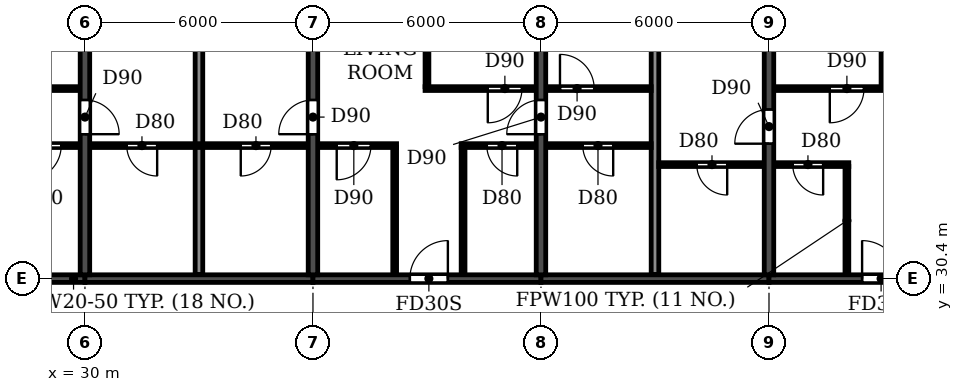
"""IFC4 building model, lengths in metres.
Left out: names, types, materials, properties, quantities, classifications, styles, units other than length and angle.
Written with IfcOpenShell. Run it as: python <this file> out.ifc"""

import sys

from ifc_helpers import new_model, si_unit, direction, frame, frame_2d, origin, place, context, subcontext, project, spatial, rectangle, extrude, element, fill, save


model = new_model("IFC4")
c1 = context("Model", 3, precision=1e-05, world=origin(), true_north=direction((0.0, 1.0)))
c2 = subcontext(c1, "Body", "Model", "MODEL_VIEW")
j1 = project(units=[si_unit("LENGTHUNIT", "METRE"), si_unit("PLANEANGLEUNIT", "RADIAN")], contexts=[c1])
p1 = place(None, origin())
s1 = spatial("IfcSite", under=j1, at=p1, CompositionType="ELEMENT")
p2 = place(p1, origin())
s2 = spatial("IfcBuilding", under=s1, at=p2, CompositionType="ELEMENT")
p3 = place(p2, frame((0.0, 0.0, 241.2)))
s3 = spatial("IfcBuildingStorey", under=s2, at=p3, CompositionType="ELEMENT", Elevation=241.2)
p4 = place(p3, frame((30.0, 30.5, 0.0), z_axis=(0.0, 0.0, 1.0), x_axis=(0.0, 1.0, 0.0)))
e1 = element("IfcWall", 1, at=p4, inside=s3, PredefinedType="SHEAR", context=c2, shape_type="SweptSolid", body=[
    extrude(rectangle(XDim=10.5, YDim=0.25, at=frame_2d((5.25, 0.0))), origin(), (0.0, 0.0, 1.0), 3.08),
])
p5 = place(p4, frame((3.7, 0.0, 0.0)))
e2 = element("IfcOpeningElement", 2, at=p5, cuts=e1, PredefinedType="OPENING", context=c2, shape_type="SweptSolid", body=[
    extrude(rectangle(XDim=0.9, YDim=2.1, at=frame_2d((0.45, 1.05))), frame((0.0, 0.135, 0.0), z_axis=(0.0, -1.0, 0.0), x_axis=(1.0, 0.0, 0.0)), (0.0, 0.0, 1.0), 0.27),
])
p6 = place(p3, frame((36.0, 30.5, 0.0), z_axis=(0.0, 0.0, 1.0), x_axis=(0.0, 1.0, 0.0)))
e3 = element("IfcWall", 3, at=p6, inside=s3, PredefinedType="SHEAR", context=c2, shape_type="SweptSolid", body=[
    extrude(rectangle(XDim=10.5, YDim=0.25, at=frame_2d((5.25, 0.0))), origin(), (0.0, 0.0, 1.0), 3.08),
])
p7 = place(p6, frame((3.7, 0.0, 0.0)))
e4 = element("IfcOpeningElement", 4, at=p7, cuts=e3, PredefinedType="OPENING", context=c2, shape_type="SweptSolid", body=[
    extrude(rectangle(XDim=0.9, YDim=2.1, at=frame_2d((0.45, 1.05))), frame((0.0, 0.135, 0.0), z_axis=(0.0, -1.0, 0.0), x_axis=(1.0, 0.0, 0.0)), (0.0, 0.0, 1.0), 0.27),
])
p8 = place(p3, frame((42.0, 30.5, 0.0), z_axis=(0.0, 0.0, 1.0), x_axis=(0.0, 1.0, 0.0)))
e5 = element("IfcWall", 5, at=p8, inside=s3, PredefinedType="SHEAR", context=c2, shape_type="SweptSolid", body=[
    extrude(rectangle(XDim=10.5, YDim=0.25, at=frame_2d((5.25, 0.0))), origin(), (0.0, 0.0, 1.0), 3.08),
])
p9 = place(p8, frame((3.7, 0.0, 0.0)))
e6 = element("IfcOpeningElement", 6, at=p9, cuts=e5, PredefinedType="OPENING", context=c2, shape_type="SweptSolid", body=[
    extrude(rectangle(XDim=0.9, YDim=2.1, at=frame_2d((0.45, 1.05))), frame((0.0, 0.135, 0.0), z_axis=(0.0, -1.0, 0.0), x_axis=(1.0, 0.0, 0.0)), (0.0, 0.0, 1.0), 0.27),
])
p10 = place(p3, frame((48.0, 30.5, 0.0), z_axis=(0.0, 0.0, 1.0), x_axis=(0.0, 1.0, 0.0)))
e7 = element("IfcWall", 7, at=p10, inside=s3, PredefinedType="SHEAR", context=c2, shape_type="SweptSolid", body=[
    extrude(rectangle(XDim=10.5, YDim=0.25, at=frame_2d((5.25, 0.0))), origin(), (0.0, 0.0, 1.0), 3.08),
])
p11 = place(p10, frame((3.45, 0.0, 0.0)))
e8 = element("IfcOpeningElement", 8, at=p11, cuts=e7, PredefinedType="OPENING", context=c2, shape_type="SweptSolid", body=[
    extrude(rectangle(XDim=0.9, YDim=2.1, at=frame_2d((0.45, 1.05))), frame((0.0, 0.135, 0.0), z_axis=(0.0, -1.0, 0.0), x_axis=(1.0, 0.0, 0.0)), (0.0, 0.0, 1.0), 0.27),
])
p12 = place(p3, frame((24.0, 30.4, 0.0), z_axis=(0.0, 0.0, 1.0), x_axis=(1.0, 0.0, 0.0)))
e9 = element("IfcWall", 9, at=p12, inside=s3, PredefinedType="SHEAR", context=c2, shape_type="SweptSolid", body=[
    extrude(rectangle(XDim=6.0, YDim=0.2, at=frame_2d((3.0, 0.0))), origin(), (0.0, 0.0, 1.0), 2.48),
])
p13 = place(p12, frame((2.45, 0.0, 0.0)))
e10 = element("IfcOpeningElement", 10, at=p13, cuts=e9, PredefinedType="OPENING", context=c2, shape_type="SweptSolid", body=[
    extrude(rectangle(XDim=1.0, YDim=2.1, at=frame_2d((0.5, 1.05))), frame((0.0, 0.11, 0.0), z_axis=(0.0, -1.0, 0.0), x_axis=(1.0, 0.0, 0.0)), (0.0, 0.0, 1.0), 0.22),
])
p14 = place(p3, frame((30.0, 30.4, 0.0), z_axis=(0.0, 0.0, 1.0), x_axis=(1.0, 0.0, 0.0)))
e11 = element("IfcWall", 11, at=p14, inside=s3, PredefinedType="SHEAR", context=c2, shape_type="SweptSolid", body=[
    extrude(rectangle(XDim=6.0, YDim=0.2, at=frame_2d((3.0, 0.0))), origin(), (0.0, 0.0, 1.0), 2.48),
])
p15 = place(p3, frame((36.0, 30.4, 0.0), z_axis=(0.0, 0.0, 1.0), x_axis=(1.0, 0.0, 0.0)))
e12 = element("IfcWall", 12, at=p15, inside=s3, PredefinedType="SHEAR", context=c2, shape_type="SweptSolid", body=[
    extrude(rectangle(XDim=6.0, YDim=0.2, at=frame_2d((3.0, 0.0))), origin(), (0.0, 0.0, 1.0), 2.48),
])
p16 = place(p15, frame((2.55, 0.0, 0.0)))
e13 = element("IfcOpeningElement", 13, at=p16, cuts=e12, PredefinedType="OPENING", context=c2, shape_type="SweptSolid", body=[
    extrude(rectangle(XDim=1.0, YDim=2.1, at=frame_2d((0.5, 1.05))), frame((0.0, 0.11, 0.0), z_axis=(0.0, -1.0, 0.0), x_axis=(1.0, 0.0, 0.0)), (0.0, 0.0, 1.0), 0.22),
])
p17 = place(p3, frame((42.0, 30.4, 0.0), z_axis=(0.0, 0.0, 1.0), x_axis=(1.0, 0.0, 0.0)))
e14 = element("IfcWall", 14, at=p17, inside=s3, PredefinedType="SHEAR", context=c2, shape_type="SweptSolid", body=[
    extrude(rectangle(XDim=6.0, YDim=0.2, at=frame_2d((3.0, 0.0))), origin(), (0.0, 0.0, 1.0), 2.48),
])
p18 = place(p3, frame((48.0, 30.4, 0.0), z_axis=(0.0, 0.0, 1.0), x_axis=(1.0, 0.0, 0.0)))
e15 = element("IfcWall", 15, at=p18, inside=s3, PredefinedType="SHEAR", context=c2, shape_type="SweptSolid", body=[
    extrude(rectangle(XDim=6.0, YDim=0.2, at=frame_2d((3.0, 0.0))), origin(), (0.0, 0.0, 1.0), 2.48),
])
p19 = place(p18, frame((2.45, 0.0, 0.0)))
e16 = element("IfcOpeningElement", 16, at=p19, cuts=e15, PredefinedType="OPENING", context=c2, shape_type="SweptSolid", body=[
    extrude(rectangle(XDim=1.0, YDim=2.1, at=frame_2d((0.5, 1.05))), frame((0.0, 0.11, 0.0), z_axis=(0.0, -1.0, 0.0), x_axis=(1.0, 0.0, 0.0)), (0.0, 0.0, 1.0), 0.22),
])
for number, where, z_axis, x_axis in (
    (17, (33.0, 30.51, 0.0), (0.0, 0.0, 1.0), (0.0, 1.0, 0.0)),
    (18, (45.0, 30.51, 0.0), (0.0, 0.0, 1.0), (0.0, 1.0, 0.0)),
):
    element("IfcWall", number, at=place(p3, frame(where, z_axis=z_axis, x_axis=x_axis)), inside=s3, PredefinedType="PARTITIONING", context=c2, shape_type="SweptSolid", body=[
        extrude(rectangle(XDim=10.63, YDim=0.2, at=frame_2d((5.315, 0.0))), origin(), (0.0, 0.0, 1.0), 3.08),
    ])
p20 = place(p3, frame((45.1, 33.4, 0.0), z_axis=(0.0, 0.0, 1.0), x_axis=(1.0, 0.0, 0.0)))
e19 = element("IfcWall", 19, at=p20, inside=s3, PredefinedType="PARTITIONING", context=c2, shape_type="SweptSolid", body=[
    extrude(rectangle(XDim=2.765, YDim=0.1, at=frame_2d((1.382, 0.0))), origin(), (0.0, 0.0, 1.0), 3.08),
])
p21 = place(p20, frame((1.0, 0.0, 0.0)))
e20 = element("IfcOpeningElement", 20, at=p21, cuts=e19, PredefinedType="OPENING", context=c2, shape_type="SweptSolid", body=[
    extrude(rectangle(XDim=0.8, YDim=2.1, at=frame_2d((0.4, 1.05))), frame((0.0, 0.06, 0.0), z_axis=(0.0, -1.0, 0.0), x_axis=(1.0, 0.0, 0.0)), (0.0, 0.0, 1.0), 0.12),
])
p22 = place(p3, frame((48.135, 33.4, 0.0), z_axis=(0.0, 0.0, 1.0), x_axis=(1.0, 0.0, 0.0)))
e21 = element("IfcWall", 21, at=p22, inside=s3, PredefinedType="PARTITIONING", context=c2, shape_type="SweptSolid", body=[
    extrude(rectangle(XDim=1.965, YDim=0.1, at=frame_2d((0.982, 0.0))), origin(), (0.0, 0.0, 1.0), 3.08),
])
p23 = place(p22, frame((0.49, 0.0, 0.0)))
e22 = element("IfcOpeningElement", 22, at=p23, cuts=e21, PredefinedType="OPENING", context=c2, shape_type="SweptSolid", body=[
    extrude(rectangle(XDim=0.8, YDim=2.1, at=frame_2d((0.4, 1.05))), frame((0.0, 0.06, 0.0), z_axis=(0.0, -1.0, 0.0), x_axis=(1.0, 0.0, 0.0)), (0.0, 0.0, 1.0), 0.12),
])
p24 = place(p3, frame((27.8, 33.9, 0.0), z_axis=(0.0, 0.0, 1.0), x_axis=(1.0, 0.0, 0.0)))
e23 = element("IfcWall", 23, at=p24, inside=s3, PredefinedType="PARTITIONING", context=c2, shape_type="SweptSolid", body=[
    extrude(rectangle(XDim=2.065, YDim=0.1, at=frame_2d((1.032, 0.0))), origin(), (0.0, 0.0, 1.0), 3.08),
])
p25 = place(p24, frame((0.675, 0.0, 0.0)))
e24 = element("IfcOpeningElement", 24, at=p25, cuts=e23, PredefinedType="OPENING", context=c2, shape_type="SweptSolid", body=[
    extrude(rectangle(XDim=0.9, YDim=2.1, at=frame_2d((0.45, 1.05))), frame((0.0, 0.06, 0.0), z_axis=(0.0, -1.0, 0.0), x_axis=(1.0, 0.0, 0.0)), (0.0, 0.0, 1.0), 0.12),
])
p26 = place(p3, frame((30.135, 33.9, 0.0), z_axis=(0.0, 0.0, 1.0), x_axis=(1.0, 0.0, 0.0)))
e25 = element("IfcWall", 25, at=p26, inside=s3, PredefinedType="PARTITIONING", context=c2, shape_type="SweptSolid", body=[
    extrude(rectangle(XDim=5.73, YDim=0.1, at=frame_2d((2.865, 0.0))), origin(), (0.0, 0.0, 1.0), 3.08),
])
p27 = place(p26, frame((0.965, 0.0, 0.0)))
e26 = element("IfcOpeningElement", 26, at=p27, cuts=e25, PredefinedType="OPENING", context=c2, shape_type="SweptSolid", body=[
    extrude(rectangle(XDim=0.8, YDim=2.1, at=frame_2d((0.4, 1.05))), frame((0.0, 0.06, 0.0), z_axis=(0.0, -1.0, 0.0), x_axis=(1.0, 0.0, 0.0)), (0.0, 0.0, 1.0), 0.12),
])
p28 = place(p26, frame((3.965, 0.0, 0.0)))
e27 = element("IfcOpeningElement", 27, at=p28, cuts=e25, PredefinedType="OPENING", context=c2, shape_type="SweptSolid", body=[
    extrude(rectangle(XDim=0.8, YDim=2.1, at=frame_2d((0.4, 1.05))), frame((0.0, 0.06, 0.0), z_axis=(0.0, -1.0, 0.0), x_axis=(1.0, 0.0, 0.0)), (0.0, 0.0, 1.0), 0.12),
])
p29 = place(p3, frame((36.135, 33.9, 0.0), z_axis=(0.0, 0.0, 1.0), x_axis=(1.0, 0.0, 0.0)))
e28 = element("IfcWall", 28, at=p29, inside=s3, PredefinedType="PARTITIONING", context=c2, shape_type="SweptSolid", body=[
    extrude(rectangle(XDim=2.065, YDim=0.1, at=frame_2d((1.032, 0.0))), origin(), (0.0, 0.0, 1.0), 3.08),
])
p30 = place(p29, frame((0.49, 0.0, 0.0)))
e29 = element("IfcOpeningElement", 29, at=p30, cuts=e28, PredefinedType="OPENING", context=c2, shape_type="SweptSolid", body=[
    extrude(rectangle(XDim=0.9, YDim=2.1, at=frame_2d((0.45, 1.05))), frame((0.0, 0.06, 0.0), z_axis=(0.0, -1.0, 0.0), x_axis=(1.0, 0.0, 0.0)), (0.0, 0.0, 1.0), 0.12),
])
p31 = place(p3, frame((39.9, 33.9, 0.0), z_axis=(0.0, 0.0, 1.0), x_axis=(1.0, 0.0, 0.0)))
e30 = element("IfcWall", 30, at=p31, inside=s3, PredefinedType="PARTITIONING", context=c2, shape_type="SweptSolid", body=[
    extrude(rectangle(XDim=1.965, YDim=0.1, at=frame_2d((0.982, 0.0))), origin(), (0.0, 0.0, 1.0), 3.08),
])
p32 = place(p31, frame((0.675, 0.0, 0.0)))
e31 = element("IfcOpeningElement", 31, at=p32, cuts=e30, PredefinedType="OPENING", context=c2, shape_type="SweptSolid", body=[
    extrude(rectangle(XDim=0.8, YDim=2.1, at=frame_2d((0.4, 1.05))), frame((0.0, 0.06, 0.0), z_axis=(0.0, -1.0, 0.0), x_axis=(1.0, 0.0, 0.0)), (0.0, 0.0, 1.0), 0.12),
])
p33 = place(p3, frame((42.135, 33.9, 0.0), z_axis=(0.0, 0.0, 1.0), x_axis=(1.0, 0.0, 0.0)))
e32 = element("IfcWall", 32, at=p33, inside=s3, PredefinedType="PARTITIONING", context=c2, shape_type="SweptSolid", body=[
    extrude(rectangle(XDim=2.765, YDim=0.1, at=frame_2d((1.382, 0.0))), origin(), (0.0, 0.0, 1.0), 3.08),
])
p34 = place(p33, frame((0.965, 0.0, 0.0)))
e33 = element("IfcOpeningElement", 33, at=p34, cuts=e32, PredefinedType="OPENING", context=c2, shape_type="SweptSolid", body=[
    extrude(rectangle(XDim=0.8, YDim=2.1, at=frame_2d((0.4, 1.05))), frame((0.0, 0.06, 0.0), z_axis=(0.0, -1.0, 0.0), x_axis=(1.0, 0.0, 0.0)), (0.0, 0.0, 1.0), 0.12),
])
p35 = place(p3, frame((26.95, 35.4, 0.0), z_axis=(0.0, 0.0, 1.0), x_axis=(1.0, 0.0, 0.0)))
e34 = element("IfcWall", 34, at=p35, inside=s3, PredefinedType="PARTITIONING", context=c2, shape_type="SweptSolid", body=[
    extrude(rectangle(XDim=2.915, YDim=0.1, at=frame_2d((1.458, 0.0))), origin(), (0.0, 0.0, 1.0), 3.08),
])
p36 = place(p35, frame((0.55, 0.0, 0.0)))
e35 = element("IfcOpeningElement", 35, at=p36, cuts=e34, PredefinedType="OPENING", context=c2, shape_type="SweptSolid", body=[
    extrude(rectangle(XDim=0.9, YDim=2.1, at=frame_2d((0.45, 1.05))), frame((0.0, 0.06, 0.0), z_axis=(0.0, -1.0, 0.0), x_axis=(1.0, 0.0, 0.0)), (0.0, 0.0, 1.0), 0.12),
])
p37 = place(p3, frame((38.95, 35.4, 0.0), z_axis=(0.0, 0.0, 1.0), x_axis=(1.0, 0.0, 0.0)))
e36 = element("IfcWall", 36, at=p37, inside=s3, PredefinedType="PARTITIONING", context=c2, shape_type="SweptSolid", body=[
    extrude(rectangle(XDim=2.915, YDim=0.1, at=frame_2d((1.458, 0.0))), origin(), (0.0, 0.0, 1.0), 3.08),
])
p38 = place(p37, frame((1.65, 0.0, 0.0)))
e37 = element("IfcOpeningElement", 37, at=p38, cuts=e36, PredefinedType="OPENING", context=c2, shape_type="SweptSolid", body=[
    extrude(rectangle(XDim=0.9, YDim=2.1, at=frame_2d((0.45, 1.05))), frame((0.0, 0.06, 0.0), z_axis=(0.0, -1.0, 0.0), x_axis=(1.0, 0.0, 0.0)), (0.0, 0.0, 1.0), 0.12),
])
p39 = place(p3, frame((42.135, 35.4, 0.0), z_axis=(0.0, 0.0, 1.0), x_axis=(1.0, 0.0, 0.0)))
e38 = element("IfcWall", 38, at=p39, inside=s3, PredefinedType="PARTITIONING", context=c2, shape_type="SweptSolid", body=[
    extrude(rectangle(XDim=2.765, YDim=0.1, at=frame_2d((1.382, 0.0))), origin(), (0.0, 0.0, 1.0), 3.08),
])
p40 = place(p39, frame((0.365, 0.0, 0.0)))
e39 = element("IfcOpeningElement", 39, at=p40, cuts=e38, PredefinedType="OPENING", context=c2, shape_type="SweptSolid", body=[
    extrude(rectangle(XDim=0.9, YDim=2.1, at=frame_2d((0.45, 1.05))), frame((0.0, 0.06, 0.0), z_axis=(0.0, -1.0, 0.0), x_axis=(1.0, 0.0, 0.0)), (0.0, 0.0, 1.0), 0.12),
])
p41 = place(p3, frame((48.135, 35.4, 0.0), z_axis=(0.0, 0.0, 1.0), x_axis=(1.0, 0.0, 0.0)))
e40 = element("IfcWall", 40, at=p41, inside=s3, PredefinedType="PARTITIONING", context=c2, shape_type="SweptSolid", body=[
    extrude(rectangle(XDim=2.915, YDim=0.1, at=frame_2d((1.458, 0.0))), origin(), (0.0, 0.0, 1.0), 3.08),
])
p42 = place(p41, frame((1.465, 0.0, 0.0)))
e41 = element("IfcOpeningElement", 41, at=p42, cuts=e40, PredefinedType="OPENING", context=c2, shape_type="SweptSolid", body=[
    extrude(rectangle(XDim=0.9, YDim=2.1, at=frame_2d((0.45, 1.05))), frame((0.0, 0.06, 0.0), z_axis=(0.0, -1.0, 0.0), x_axis=(1.0, 0.0, 0.0)), (0.0, 0.0, 1.0), 0.12),
])
p43 = place(p3, frame((38.15, 30.51, 0.0), z_axis=(0.0, 0.0, 1.0), x_axis=(0.0, 1.0, 0.0)))
e42 = element("IfcWall", 42, at=p43, inside=s3, PredefinedType="PARTITIONING", context=c2, shape_type="SweptSolid", body=[
    extrude(rectangle(XDim=3.34, YDim=0.1, at=frame_2d((1.67, 0.0))), origin(), (0.0, 0.0, 1.0), 3.08),
])
p44 = place(p3, frame((39.0, 35.45, 0.0), z_axis=(0.0, 0.0, 1.0), x_axis=(0.0, 1.0, 0.0)))
e43 = element("IfcWall", 43, at=p44, inside=s3, PredefinedType="PARTITIONING", context=c2, shape_type="SweptSolid", body=[
    extrude(rectangle(XDim=5.69, YDim=0.1, at=frame_2d((2.845, 0.0))), origin(), (0.0, 0.0, 1.0), 3.08),
])
p45 = place(p3, frame((39.95, 30.51, 0.0), z_axis=(0.0, 0.0, 1.0), x_axis=(0.0, 1.0, 0.0)))
e44 = element("IfcWall", 44, at=p45, inside=s3, PredefinedType="PARTITIONING", context=c2, shape_type="SweptSolid", body=[
    extrude(rectangle(XDim=3.34, YDim=0.1, at=frame_2d((1.67, 0.0))), origin(), (0.0, 0.0, 1.0), 3.08),
])
p46 = place(p3, frame((50.05, 30.51, 0.0), z_axis=(0.0, 0.0, 1.0), x_axis=(0.0, 1.0, 0.0)))
e45 = element("IfcWall", 45, at=p46, inside=s3, PredefinedType="PARTITIONING", context=c2, shape_type="SweptSolid", body=[
    extrude(rectangle(XDim=2.84, YDim=0.1, at=frame_2d((1.42, 0.0))), origin(), (0.0, 0.0, 1.0), 3.08),
])
p47 = place(p3, frame((51.0, 35.45, 0.0), z_axis=(0.0, 0.0, 1.0), x_axis=(0.0, 1.0, 0.0)))
e46 = element("IfcWall", 46, at=p47, inside=s3, PredefinedType="PARTITIONING", context=c2, shape_type="SweptSolid", body=[
    extrude(rectangle(XDim=5.69, YDim=0.1, at=frame_2d((2.845, 0.0))), origin(), (0.0, 0.0, 1.0), 3.08),
])
p48 = place(p27, frame((0.8, 0.0, 0.0), z_axis=(0.0, 0.0, 1.0), x_axis=(-1.0, 0.0, 0.0)))
e47 = element("IfcDoor", 47, at=p48, inside=s3, OperationType="SINGLE_SWING_LEFT", PredefinedType="DOOR", context=c2, shape_type="SweptSolid", body=[
    extrude(rectangle(XDim=0.8, YDim=2.1, at=frame_2d((0.4, 1.05))), frame((0.0, 0.025, 0.0), z_axis=(0.0, -1.0, 0.0), x_axis=(1.0, 0.0, 0.0)), (0.0, 0.0, 1.0), 0.05),
])
fill(e26, e47)
p49 = place(p25, frame((0.9, 0.0, 0.0), z_axis=(0.0, 0.0, 1.0), x_axis=(-1.0, 0.0, 0.0)))
e48 = element("IfcDoor", 48, at=p49, inside=s3, OperationType="SINGLE_SWING_RIGHT", PredefinedType="DOOR", context=c2, shape_type="SweptSolid", body=[
    extrude(rectangle(XDim=0.9, YDim=2.1, at=frame_2d((0.45, 1.05))), frame((0.0, 0.025, 0.0), z_axis=(0.0, -1.0, 0.0), x_axis=(1.0, 0.0, 0.0)), (0.0, 0.0, 1.0), 0.05),
])
fill(e24, e48)
p50 = place(p5, frame((0.9, 0.0, 0.0), z_axis=(0.0, 0.0, 1.0), x_axis=(-1.0, 0.0, 0.0)))
e49 = element("IfcDoor", 49, at=p50, inside=s3, OperationType="SINGLE_SWING_RIGHT", PredefinedType="DOOR", context=c2, shape_type="SweptSolid", body=[
    extrude(rectangle(XDim=0.9, YDim=2.1, at=frame_2d((0.45, 1.05))), frame((0.0, 0.025, 0.0), z_axis=(0.0, -1.0, 0.0), x_axis=(1.0, 0.0, 0.0)), (0.0, 0.0, 1.0), 0.05),
])
fill(e2, e49)
p51 = place(p28, frame((0.8, 0.0, 0.0), z_axis=(0.0, 0.0, 1.0), x_axis=(-1.0, 0.0, 0.0)))
e50 = element("IfcDoor", 50, at=p51, inside=s3, OperationType="SINGLE_SWING_RIGHT", PredefinedType="DOOR", context=c2, shape_type="SweptSolid", body=[
    extrude(rectangle(XDim=0.8, YDim=2.1, at=frame_2d((0.4, 1.05))), frame((0.0, 0.025, 0.0), z_axis=(0.0, -1.0, 0.0), x_axis=(1.0, 0.0, 0.0)), (0.0, 0.0, 1.0), 0.05),
])
fill(e27, e50)
p52 = place(p40, origin())
e51 = element("IfcDoor", 51, at=p52, inside=s3, OperationType="SINGLE_SWING_LEFT", PredefinedType="DOOR", context=c2, shape_type="SweptSolid", body=[
    extrude(rectangle(XDim=0.9, YDim=2.1, at=frame_2d((0.45, 1.05))), frame((0.0, 0.025, 0.0), z_axis=(0.0, -1.0, 0.0), x_axis=(1.0, 0.0, 0.0)), (0.0, 0.0, 1.0), 0.05),
])
fill(e39, e51)
p53 = place(p34, frame((0.8, 0.0, 0.0), z_axis=(0.0, 0.0, 1.0), x_axis=(-1.0, 0.0, 0.0)))
e52 = element("IfcDoor", 52, at=p53, inside=s3, OperationType="SINGLE_SWING_LEFT", PredefinedType="DOOR", context=c2, shape_type="SweptSolid", body=[
    extrude(rectangle(XDim=0.8, YDim=2.1, at=frame_2d((0.4, 1.05))), frame((0.0, 0.025, 0.0), z_axis=(0.0, -1.0, 0.0), x_axis=(1.0, 0.0, 0.0)), (0.0, 0.0, 1.0), 0.05),
])
fill(e33, e52)
p54 = place(p7, origin())
e53 = element("IfcDoor", 53, at=p54, inside=s3, OperationType="SINGLE_SWING_LEFT", PredefinedType="DOOR", context=c2, shape_type="SweptSolid", body=[
    extrude(rectangle(XDim=0.9, YDim=2.1, at=frame_2d((0.45, 1.05))), frame((0.0, 0.025, 0.0), z_axis=(0.0, -1.0, 0.0), x_axis=(1.0, 0.0, 0.0)), (0.0, 0.0, 1.0), 0.05),
])
fill(e4, e53)
p55 = place(p30, frame((0.9, 0.0, 0.0), z_axis=(0.0, 0.0, 1.0), x_axis=(-1.0, 0.0, 0.0)))
e54 = element("IfcDoor", 54, at=p55, inside=s3, OperationType="SINGLE_SWING_RIGHT", PredefinedType="DOOR", context=c2, shape_type="SweptSolid", body=[
    extrude(rectangle(XDim=0.9, YDim=2.1, at=frame_2d((0.45, 1.05))), frame((0.0, 0.025, 0.0), z_axis=(0.0, -1.0, 0.0), x_axis=(1.0, 0.0, 0.0)), (0.0, 0.0, 1.0), 0.05),
])
fill(e29, e54)
p56 = place(p16, origin())
e55 = element("IfcDoor", 55, at=p56, inside=s3, OperationType="SINGLE_SWING_RIGHT", PredefinedType="DOOR", context=c2, shape_type="SweptSolid", body=[
    extrude(rectangle(XDim=1.0, YDim=2.1, at=frame_2d((0.5, 1.05))), frame((0.0, 0.025, 0.0), z_axis=(0.0, -1.0, 0.0), x_axis=(1.0, 0.0, 0.0)), (0.0, 0.0, 1.0), 0.05),
])
fill(e13, e55)
p57 = place(p32, frame((0.8, 0.0, 0.0), z_axis=(0.0, 0.0, 1.0), x_axis=(-1.0, 0.0, 0.0)))
e56 = element("IfcDoor", 56, at=p57, inside=s3, OperationType="SINGLE_SWING_LEFT", PredefinedType="DOOR", context=c2, shape_type="SweptSolid", body=[
    extrude(rectangle(XDim=0.8, YDim=2.1, at=frame_2d((0.4, 1.05))), frame((0.0, 0.025, 0.0), z_axis=(0.0, -1.0, 0.0), x_axis=(1.0, 0.0, 0.0)), (0.0, 0.0, 1.0), 0.05),
])
fill(e31, e56)
p58 = place(p38, frame((0.9, 0.0, 0.0), z_axis=(0.0, 0.0, 1.0), x_axis=(-1.0, 0.0, 0.0)))
e57 = element("IfcDoor", 57, at=p58, inside=s3, OperationType="SINGLE_SWING_RIGHT", PredefinedType="DOOR", context=c2, shape_type="SweptSolid", body=[
    extrude(rectangle(XDim=0.9, YDim=2.1, at=frame_2d((0.45, 1.05))), frame((0.0, 0.025, 0.0), z_axis=(0.0, -1.0, 0.0), x_axis=(1.0, 0.0, 0.0)), (0.0, 0.0, 1.0), 0.05),
])
fill(e37, e57)
p59 = place(p9, origin())
e58 = element("IfcDoor", 58, at=p59, inside=s3, OperationType="SINGLE_SWING_LEFT", PredefinedType="DOOR", context=c2, shape_type="SweptSolid", body=[
    extrude(rectangle(XDim=0.9, YDim=2.1, at=frame_2d((0.45, 1.05))), frame((0.0, 0.025, 0.0), z_axis=(0.0, -1.0, 0.0), x_axis=(1.0, 0.0, 0.0)), (0.0, 0.0, 1.0), 0.05),
])
fill(e6, e58)
p60 = place(p21, frame((0.8, 0.0, 0.0), z_axis=(0.0, 0.0, 1.0), x_axis=(-1.0, 0.0, 0.0)))
e59 = element("IfcDoor", 59, at=p60, inside=s3, OperationType="SINGLE_SWING_LEFT", PredefinedType="DOOR", context=c2, shape_type="SweptSolid", body=[
    extrude(rectangle(XDim=0.8, YDim=2.1, at=frame_2d((0.4, 1.05))), frame((0.0, 0.025, 0.0), z_axis=(0.0, -1.0, 0.0), x_axis=(1.0, 0.0, 0.0)), (0.0, 0.0, 1.0), 0.05),
])
fill(e20, e59)
p61 = place(p11, origin())
e60 = element("IfcDoor", 60, at=p61, inside=s3, OperationType="SINGLE_SWING_LEFT", PredefinedType="DOOR", context=c2, shape_type="SweptSolid", body=[
    extrude(rectangle(XDim=0.9, YDim=2.1, at=frame_2d((0.45, 1.05))), frame((0.0, 0.025, 0.0), z_axis=(0.0, -1.0, 0.0), x_axis=(1.0, 0.0, 0.0)), (0.0, 0.0, 1.0), 0.05),
])
fill(e8, e60)
p62 = place(p23, frame((0.8, 0.0, 0.0), z_axis=(0.0, 0.0, 1.0), x_axis=(-1.0, 0.0, 0.0)))
e61 = element("IfcDoor", 61, at=p62, inside=s3, OperationType="SINGLE_SWING_LEFT", PredefinedType="DOOR", context=c2, shape_type="SweptSolid", body=[
    extrude(rectangle(XDim=0.8, YDim=2.1, at=frame_2d((0.4, 1.05))), frame((0.0, 0.025, 0.0), z_axis=(0.0, -1.0, 0.0), x_axis=(1.0, 0.0, 0.0)), (0.0, 0.0, 1.0), 0.05),
])
fill(e22, e61)
p63 = place(p42, frame((0.9, 0.0, 0.0), z_axis=(0.0, 0.0, 1.0), x_axis=(-1.0, 0.0, 0.0)))
e62 = element("IfcDoor", 62, at=p63, inside=s3, OperationType="SINGLE_SWING_RIGHT", PredefinedType="DOOR", context=c2, shape_type="SweptSolid", body=[
    extrude(rectangle(XDim=0.9, YDim=2.1, at=frame_2d((0.45, 1.05))), frame((0.0, 0.025, 0.0), z_axis=(0.0, -1.0, 0.0), x_axis=(1.0, 0.0, 0.0)), (0.0, 0.0, 1.0), 0.05),
])
fill(e41, e62)
p64 = place(p19, origin())
e63 = element("IfcDoor", 63, at=p64, inside=s3, OperationType="SINGLE_SWING_LEFT", PredefinedType="DOOR", context=c2, shape_type="SweptSolid", body=[
    extrude(rectangle(XDim=1.0, YDim=2.1, at=frame_2d((0.5, 1.05))), frame((0.0, 0.025, 0.0), z_axis=(0.0, -1.0, 0.0), x_axis=(1.0, 0.0, 0.0)), (0.0, 0.0, 1.0), 0.05),
])
fill(e16, e63)
save(model, sys.argv[1])
